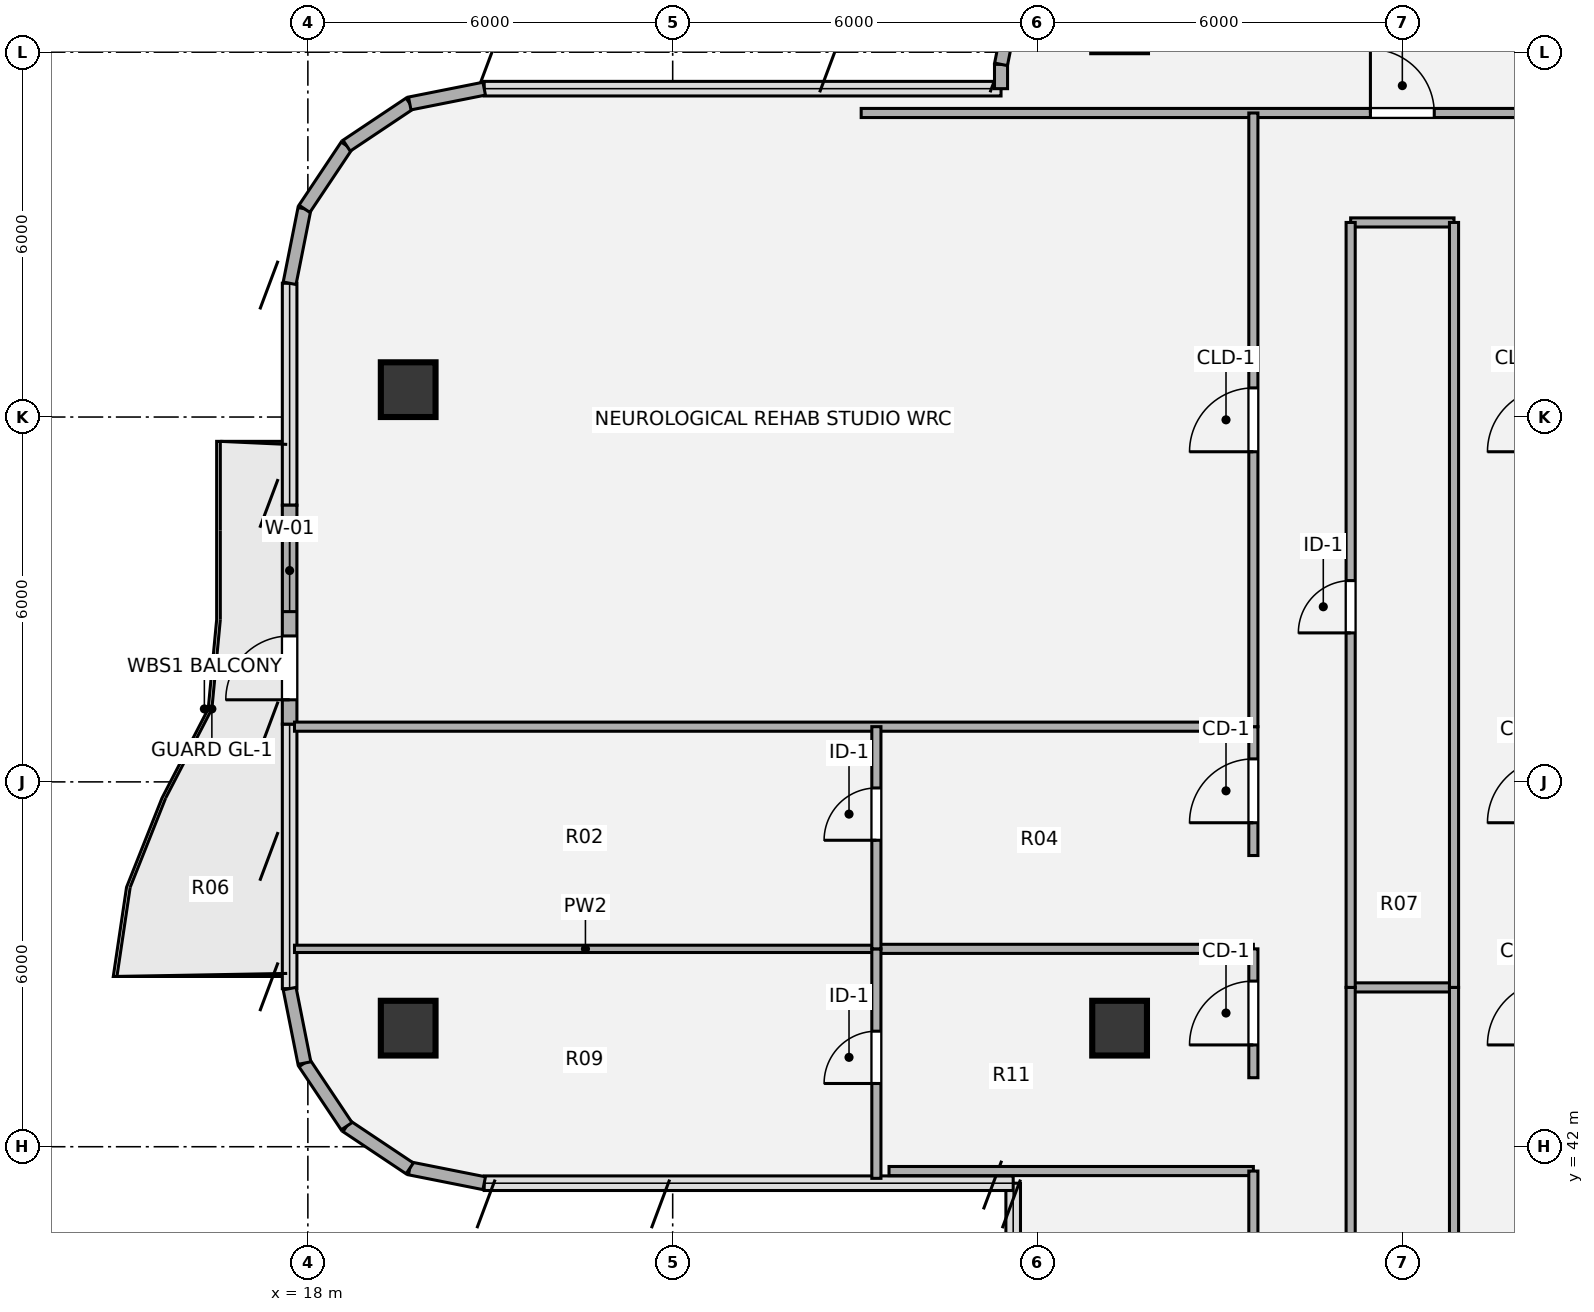
"""IFC4 building model, lengths in metres.
Left out: names, types, materials, properties, quantities, classifications, styles, units other than length and angle.
Written with IfcOpenShell. Run it as: python <this file> out.ifc"""

import sys

from ifc_helpers import new_model, si_unit, direction, frame, frame_2d, origin, origin_2d, place, context, subcontext, project, spatial, rectangle, hollow_circle, extrude, source, transform, mapped, element, fill, save


model = new_model("IFC4")
c1 = context("Model", 3, precision=1e-05, world=origin(), true_north=direction((0.0, 1.0)))
c2 = subcontext(c1, "Body", "Model", "MODEL_VIEW")
j1 = project(units=[si_unit("LENGTHUNIT", "METRE"), si_unit("PLANEANGLEUNIT", "RADIAN")], contexts=[c1])
p1 = place(None, origin())
s1 = spatial("IfcSite", under=j1, at=p1, CompositionType="ELEMENT")
p2 = place(p1, origin())
s2 = spatial("IfcBuilding", under=s1, at=p2, CompositionType="ELEMENT")
p3 = place(p2, frame((0.0, 0.0, 241.92)))
s3 = spatial("IfcBuildingStorey", under=s2, at=p3, CompositionType="ELEMENT", Elevation=241.92)
m1 = source(origin(), c2, "Body", "SweptSolid", [
    extrude(hollow_circle(Radius=0.45, WallThickness=0.032, at=origin_2d()), origin(), (0.0, 0.0, 1.0), 3.78),
])
for number, where, z_axis, x_axis in (
    (1, (19.65, 43.95, 0.0), (0.0, 0.0, 1.0), (1.0, 0.0, 0.0)),
    (2, (19.65, 54.45, 0.0), (0.0, 0.0, 1.0), (1.0, 0.0, 0.0)),
    (3, (31.35, 43.95, 0.0), (0.0, 0.0, 1.0), (1.0, 0.0, 0.0)),
):
    element("IfcColumn", number, at=place(p3, frame(where, z_axis=z_axis, x_axis=x_axis)), inside=s3, PredefinedType="COLUMN", context=c2, shape_type="MappedRepresentation", body=[
        mapped(m1, transform((0.0, 0.0, 0.0), x_axis=(1.0, 0.0, 0.0), y_axis=(0.0, 1.0, 0.0), z_axis=(0.0, 0.0, 1.0), scale=1.0)),
    ])
for number, where, z_axis, x_axis in (
    (4, (20.9, 41.4, 0.0), (0.0, 0.0, 1.0), (-0.981, 0.195, 0.0)),
    (5, (19.675, 41.644, 0.0), (0.0, 0.0, 1.0), (-0.831, 0.556, 0.0)),
    (6, (18.637, 42.337, 0.0), (0.0, 0.0, 1.0), (-0.556, 0.831, 0.0)),
    (7, (17.944, 43.375, 0.0), (0.0, 0.0, 1.0), (-0.195, 0.981, 0.0)),
):
    element("IfcWall", number, at=place(p3, frame(where, z_axis=z_axis, x_axis=x_axis)), inside=s3, PredefinedType="SOLIDWALL", context=c2, shape_type="SweptSolid", body=[
        extrude(rectangle(XDim=1.249, YDim=0.215, at=frame_2d((0.624, 0.0))), origin(), (0.0, 0.0, 1.0), 3.53),
    ])
p4 = place(p3, frame((17.7, 48.95, 0.0), z_axis=(0.0, 0.0, 1.0), x_axis=(0.0, 1.0, 0.0)))
e8 = element("IfcWall", 8, at=p4, inside=s3, PredefinedType="SOLIDWALL", context=c2, shape_type="SweptSolid", body=[
    extrude(rectangle(XDim=3.6, YDim=0.24, at=frame_2d((1.8, 0.0))), origin(), (0.0, 0.0, 1.0), 3.53),
])
p5 = place(p4, frame((0.4, 0.0, 0.0)))
e9 = element("IfcOpeningElement", 9, at=p5, cuts=e8, PredefinedType="OPENING", context=c2, shape_type="SweptSolid", body=[
    extrude(rectangle(XDim=1.05, YDim=2.15, at=origin_2d()), frame((0.525, 0.13, 1.075), z_axis=(0.0, -1.0, 0.0), x_axis=(1.0, 0.0, 0.0)), (0.0, 0.0, 1.0), 0.26),
])
p6 = place(p4, frame((1.85, 0.0, 0.85)))
e10 = element("IfcOpeningElement", 10, at=p6, cuts=e8, PredefinedType="OPENING", context=c2, shape_type="SweptSolid", body=[
    extrude(rectangle(XDim=1.35, YDim=1.35, at=origin_2d()), frame((0.675, 0.13, 0.675), z_axis=(0.0, -1.0, 0.0), x_axis=(1.0, 0.0, 0.0)), (0.0, 0.0, 1.0), 0.26),
])
for number, where, z_axis, x_axis in (
    (11, (17.7, 56.2, 0.0), (0.0, 0.0, 1.0), (0.195, 0.981, 0.0)),
    (12, (17.944, 57.425, 0.0), (0.0, 0.0, 1.0), (0.556, 0.831, 0.0)),
    (13, (18.637, 58.463, 0.0), (0.0, 0.0, 1.0), (0.831, 0.556, 0.0)),
    (14, (19.675, 59.156, 0.0), (0.0, 0.0, 1.0), (0.981, 0.195, 0.0)),
):
    element("IfcWall", number, at=place(p3, frame(where, z_axis=z_axis, x_axis=x_axis)), inside=s3, PredefinedType="SOLIDWALL", context=c2, shape_type="SweptSolid", body=[
        extrude(rectangle(XDim=1.249, YDim=0.215, at=frame_2d((0.624, 0.0))), origin(), (0.0, 0.0, 1.0), 3.53),
    ])
p7 = place(p3, frame((29.4, 59.4, 0.0), z_axis=(0.0, 0.0, 1.0), x_axis=(0.0, 1.0, 0.0)))
e15 = element("IfcWall", 15, at=p7, inside=s3, PredefinedType="SOLIDWALL", context=c2, shape_type="SweptSolid", body=[
    extrude(rectangle(XDim=0.4, YDim=0.215, at=frame_2d((0.2, 0.0))), origin(), (0.0, 0.0, 1.0), 3.53),
])
p8 = place(p3, frame((29.4, 59.8, 0.0), z_axis=(0.0, 0.0, 1.0), x_axis=(0.195190360752, 0.980765376158, 0.0)))
e16 = element("IfcWall", 16, at=p8, inside=s3, PredefinedType="SOLIDWALL", context=c2, shape_type="SweptSolid", body=[
    extrude(rectangle(XDim=1.014, YDim=0.215, at=frame_2d((0.507, 0.0))), origin(), (0.0, 0.0, 1.0), 3.53),
])
p9 = place(p3, frame((27.558, 41.6, 0.0), z_axis=(0.0, 0.0, 1.0), x_axis=(1.0, 0.0, 0.0)))
e17 = element("IfcWall", 17, at=p9, inside=s3, PredefinedType="PARTITIONING", context=c2, shape_type="SweptSolid", body=[
    extrude(rectangle(XDim=5.992, YDim=0.15, at=frame_2d((2.996, 0.0))), origin(), (0.0, 0.0, 1.0), 3.5),
])
p10 = place(p3, frame((35.15, 44.62, 0.0), z_axis=(0.0, 0.0, 1.0), x_axis=(1.0, 0.0, 0.0)))
e18 = element("IfcWall", 18, at=p10, inside=s3, PredefinedType="PARTITIONING", context=c2, shape_type="SweptSolid", body=[
    extrude(rectangle(XDim=1.7, YDim=0.15, at=frame_2d((0.85, 0.0))), origin(), (0.0, 0.0, 1.0), 3.259),
])
p11 = place(p3, frame((17.78, 45.254, 0.0), z_axis=(0.0, 0.0, 1.0), x_axis=(1.0, 0.0, 0.0)))
e19 = element("IfcWall", 19, at=p11, inside=s3, PredefinedType="PARTITIONING", context=c2, shape_type="SweptSolid", body=[
    extrude(rectangle(XDim=9.57, YDim=0.12, at=frame_2d((4.785, 0.0))), origin(), (0.0, 0.0, 1.0), 2.982),
])
p12 = place(p3, frame((27.35, 45.254, 0.0), z_axis=(0.0, 0.0, 1.0), x_axis=(1.0, 0.0, 0.0)))
e20 = element("IfcWall", 20, at=p12, inside=s3, PredefinedType="PARTITIONING", context=c2, shape_type="SweptSolid", body=[
    extrude(rectangle(XDim=6.2, YDim=0.15, at=frame_2d((3.1, 0.0))), origin(), (0.0, 0.0, 1.0), 2.982),
])
p13 = place(p3, frame((17.78, 48.908, 0.0), z_axis=(0.0, 0.0, 1.0), x_axis=(1.0, 0.0, 0.0)))
e21 = element("IfcWall", 21, at=p13, inside=s3, PredefinedType="PARTITIONING", context=c2, shape_type="SweptSolid", body=[
    extrude(rectangle(XDim=15.77, YDim=0.15, at=frame_2d((7.885, 0.0))), origin(), (0.0, 0.0, 1.0), 2.982),
])
p14 = place(p3, frame((35.15, 57.2, 0.0), z_axis=(0.0, 0.0, 1.0), x_axis=(1.0, 0.0, 0.0)))
e22 = element("IfcWall", 22, at=p14, inside=s3, PredefinedType="PARTITIONING", context=c2, shape_type="SweptSolid", body=[
    extrude(rectangle(XDim=1.7, YDim=0.15, at=frame_2d((0.85, 0.0))), origin(), (0.0, 0.0, 1.0), 3.308),
])
p15 = place(p3, frame((27.1, 59.0, 0.0), z_axis=(0.0, 0.0, 1.0), x_axis=(1.0, 0.0, 0.0)))
e23 = element("IfcWall", 23, at=p15, inside=s3, PredefinedType="PARTITIONING", context=c2, shape_type="SweptSolid", body=[
    extrude(rectangle(XDim=17.8, YDim=0.15, at=frame_2d((8.9, 0.0))), origin(), (0.0, 0.0, 1.0), 3.308),
])
p16 = place(p15, frame((8.375, 0.0, 0.0)))
e24 = element("IfcOpeningElement", 24, at=p16, cuts=e23, PredefinedType="OPENING", context=c2, shape_type="SweptSolid", body=[
    extrude(rectangle(XDim=1.05, YDim=2.1, at=origin_2d()), frame((0.525, 0.085, 1.05), z_axis=(0.0, -1.0, 0.0), x_axis=(1.0, 0.0, 0.0)), (0.0, 0.0, 1.0), 0.17),
])
p17 = place(p3, frame((27.35, 41.48, 0.0), z_axis=(0.0, 0.0, 1.0), x_axis=(0.0, 1.0, 0.0)))
e25 = element("IfcWall", 25, at=p17, inside=s3, PredefinedType="PARTITIONING", context=c2, shape_type="SweptSolid", body=[
    extrude(rectangle(XDim=3.774, YDim=0.15, at=frame_2d((1.887, 0.0))), origin(), (0.0, 0.0, 1.0), 3.5),
])
p18 = place(p17, frame((1.56, 0.0, 0.0)))
e26 = element("IfcOpeningElement", 26, at=p18, cuts=e25, PredefinedType="OPENING", context=c2, shape_type="SweptSolid", body=[
    extrude(rectangle(XDim=0.86, YDim=2.1, at=origin_2d()), frame((0.43, 0.085, 1.05), z_axis=(0.0, -1.0, 0.0), x_axis=(1.0, 0.0, 0.0)), (0.0, 0.0, 1.0), 0.17),
])
p19 = place(p3, frame((27.35, 45.254, 0.0), z_axis=(0.0, 0.0, 1.0), x_axis=(0.0, 1.0, 0.0)))
e27 = element("IfcWall", 27, at=p19, inside=s3, PredefinedType="PARTITIONING", context=c2, shape_type="SweptSolid", body=[
    extrude(rectangle(XDim=3.654, YDim=0.15, at=frame_2d((1.827, 0.0))), origin(), (0.0, 0.0, 1.0), 3.5),
])
p20 = place(p19, frame((1.786, 0.0, 0.0)))
e28 = element("IfcOpeningElement", 28, at=p20, cuts=e27, PredefinedType="OPENING", context=c2, shape_type="SweptSolid", body=[
    extrude(rectangle(XDim=0.86, YDim=2.1, at=origin_2d()), frame((0.43, 0.085, 1.05), z_axis=(0.0, -1.0, 0.0), x_axis=(1.0, 0.0, 0.0)), (0.0, 0.0, 1.0), 0.17),
])
p21 = place(p3, frame((33.55, 21.2, 0.0), z_axis=(0.0, 0.0, 1.0), x_axis=(0.0, 1.0, 0.0)))
e29 = element("IfcWall", 29, at=p21, inside=s3, PredefinedType="PARTITIONING", context=c2, shape_type="SweptSolid", body=[
    extrude(rectangle(XDim=20.4, YDim=0.15, at=frame_2d((10.2, 0.0))), origin(), (0.0, 0.0, 1.0), 3.5),
])
p22 = place(p21, frame((9.64, 0.0, 0.0)))
e30 = element("IfcOpeningElement", 30, at=p22, cuts=e29, PredefinedType="OPENING", context=c2, shape_type="SweptSolid", body=[
    extrude(rectangle(XDim=0.86, YDim=2.1, at=origin_2d()), frame((0.43, 0.085, 1.05), z_axis=(0.0, -1.0, 0.0), x_axis=(1.0, 0.0, 0.0)), (0.0, 0.0, 1.0), 0.17),
])
p23 = place(p3, frame((33.55, 43.135, 0.0), z_axis=(0.0, 0.0, 1.0), x_axis=(0.0, 1.0, 0.0)))
e31 = element("IfcWall", 31, at=p23, inside=s3, PredefinedType="PARTITIONING", context=c2, shape_type="SweptSolid", body=[
    extrude(rectangle(XDim=2.119, YDim=0.15, at=frame_2d((1.06, 0.0))), origin(), (0.0, 0.0, 1.0), 3.5),
])
p24 = place(p23, frame((0.539, 0.0, 0.0)))
e32 = element("IfcOpeningElement", 32, at=p24, cuts=e31, PredefinedType="OPENING", context=c2, shape_type="SweptSolid", body=[
    extrude(rectangle(XDim=1.05, YDim=2.1, at=origin_2d()), frame((0.525, 0.085, 1.05), z_axis=(0.0, -1.0, 0.0), x_axis=(1.0, 0.0, 0.0)), (0.0, 0.0, 1.0), 0.17),
])
p25 = place(p3, frame((33.55, 46.789, 0.0), z_axis=(0.0, 0.0, 1.0), x_axis=(0.0, 1.0, 0.0)))
e33 = element("IfcWall", 33, at=p25, inside=s3, PredefinedType="PARTITIONING", context=c2, shape_type="SweptSolid", body=[
    extrude(rectangle(XDim=2.119, YDim=0.15, at=frame_2d((1.06, 0.0))), origin(), (0.0, 0.0, 1.0), 3.5),
])
p26 = place(p25, frame((0.539, 0.0, 0.0)))
e34 = element("IfcOpeningElement", 34, at=p26, cuts=e33, PredefinedType="OPENING", context=c2, shape_type="SweptSolid", body=[
    extrude(rectangle(XDim=1.05, YDim=2.1, at=origin_2d()), frame((0.525, 0.085, 1.05), z_axis=(0.0, -1.0, 0.0), x_axis=(1.0, 0.0, 0.0)), (0.0, 0.0, 1.0), 0.17),
])
p27 = place(p3, frame((33.55, 48.908, 0.0), z_axis=(0.0, 0.0, 1.0), x_axis=(0.0, 1.0, 0.0)))
e35 = element("IfcWall", 35, at=p27, inside=s3, PredefinedType="PARTITIONING", context=c2, shape_type="SweptSolid", body=[
    extrude(rectangle(XDim=10.092, YDim=0.15, at=frame_2d((5.046, 0.0))), origin(), (0.0, 0.0, 1.0), 3.5),
])
p28 = place(p27, frame((4.521, 0.0, 0.0)))
e36 = element("IfcOpeningElement", 36, at=p28, cuts=e35, PredefinedType="OPENING", context=c2, shape_type="SweptSolid", body=[
    extrude(rectangle(XDim=1.05, YDim=2.1, at=origin_2d()), frame((0.525, 0.085, 1.05), z_axis=(0.0, -1.0, 0.0), x_axis=(1.0, 0.0, 0.0)), (0.0, 0.0, 1.0), 0.17),
])
p29 = place(p3, frame((35.15, 25.2, 0.0), z_axis=(0.0, 0.0, 1.0), x_axis=(0.0, 1.0, 0.0)))
e37 = element("IfcWall", 37, at=p29, inside=s3, PredefinedType="PARTITIONING", context=c2, shape_type="SweptSolid", body=[
    extrude(rectangle(XDim=19.42, YDim=0.15, at=frame_2d((9.71, 0.0))), origin(), (0.0, 0.0, 1.0), 3.5),
])
p30 = place(p3, frame((35.15, 44.62, 0.0), z_axis=(0.0, 0.0, 1.0), x_axis=(0.0, 1.0, 0.0)))
e38 = element("IfcWall", 38, at=p30, inside=s3, PredefinedType="PARTITIONING", context=c2, shape_type="SweptSolid", body=[
    extrude(rectangle(XDim=12.58, YDim=0.15, at=frame_2d((6.29, 0.0))), origin(), (0.0, 0.0, 1.0), 3.5),
])
p31 = place(p30, frame((5.83, 0.0, 0.0)))
e39 = element("IfcOpeningElement", 39, at=p31, cuts=e38, PredefinedType="OPENING", context=c2, shape_type="SweptSolid", body=[
    extrude(rectangle(XDim=0.86, YDim=2.1, at=origin_2d()), frame((0.43, 0.085, 1.05), z_axis=(0.0, -1.0, 0.0), x_axis=(1.0, 0.0, 0.0)), (0.0, 0.0, 1.0), 0.17),
])
p32 = place(p3, frame((36.85, 25.2, 0.0), z_axis=(0.0, 0.0, 1.0), x_axis=(0.0, 1.0, 0.0)))
e40 = element("IfcWall", 40, at=p32, inside=s3, PredefinedType="PARTITIONING", context=c2, shape_type="SweptSolid", body=[
    extrude(rectangle(XDim=19.42, YDim=0.15, at=frame_2d((9.71, 0.0))), origin(), (0.0, 0.0, 1.0), 3.5),
])
p33 = place(p32, frame((9.185, 0.0, 0.0)))
e41 = element("IfcOpeningElement", 41, at=p33, cuts=e40, PredefinedType="OPENING", context=c2, shape_type="SweptSolid", body=[
    extrude(rectangle(XDim=1.05, YDim=2.1, at=origin_2d()), frame((0.525, 0.085, 1.05), z_axis=(0.0, -1.0, 0.0), x_axis=(1.0, 0.0, 0.0)), (0.0, 0.0, 1.0), 0.17),
])
p34 = place(p3, frame((36.85, 44.62, 0.0), z_axis=(0.0, 0.0, 1.0), x_axis=(0.0, 1.0, 0.0)))
e42 = element("IfcWall", 42, at=p34, inside=s3, PredefinedType="PARTITIONING", context=c2, shape_type="SweptSolid", body=[
    extrude(rectangle(XDim=12.58, YDim=0.15, at=frame_2d((6.29, 0.0))), origin(), (0.0, 0.0, 1.0), 3.5),
])
m2 = source(origin(), c2, "Body", "SweptSolid", [
    extrude(rectangle(XDim=1.05, YDim=2.15, at=origin_2d()), frame((0.525, 0.025, 1.075), z_axis=(0.0, -1.0, 0.0), x_axis=(1.0, 0.0, 0.0)), (0.0, 0.0, 1.0), 0.05),
])
p35 = place(p5, origin())
e43 = element("IfcDoor", 43, at=p35, inside=s3, OperationType="SINGLE_SWING_LEFT", PredefinedType="DOOR", context=c2, shape_type="MappedRepresentation", body=[
    mapped(m2, transform((0.0, 0.0, 0.0), x_axis=(1.0, 0.0, 0.0), y_axis=(0.0, 1.0, 0.0), z_axis=(0.0, 0.0, 1.0), scale=1.0)),
])
fill(e9, e43)
m3 = source(origin(), c2, "Body", "SweptSolid", [
    extrude(rectangle(XDim=1.35, YDim=1.35, at=origin_2d()), frame((0.675, 0.03, 0.675), z_axis=(0.0, -1.0, 0.0), x_axis=(1.0, 0.0, 0.0)), (0.0, 0.0, 1.0), 0.06),
])
p36 = place(p6, origin())
e44 = element("IfcWindow", 44, at=p36, inside=s3, PartitioningType="SINGLE_PANEL", PredefinedType="WINDOW", context=c2, shape_type="MappedRepresentation", body=[
    mapped(m3, transform((0.0, 0.0, 0.0), x_axis=(1.0, 0.0, 0.0), y_axis=(0.0, 1.0, 0.0), z_axis=(0.0, 0.0, 1.0), scale=1.0)),
])
fill(e10, e44)
m4 = source(origin(), c2, "Body", "SweptSolid", [
    extrude(rectangle(XDim=1.05, YDim=2.1, at=origin_2d()), frame((0.525, 0.025, 1.05), z_axis=(0.0, -1.0, 0.0), x_axis=(1.0, 0.0, 0.0)), (0.0, 0.0, 1.0), 0.05),
])
p37 = place(p16, origin())
e45 = element("IfcDoor", 45, at=p37, inside=s3, OperationType="SINGLE_SWING_LEFT", PredefinedType="DOOR", context=c2, shape_type="MappedRepresentation", body=[
    mapped(m4, transform((0.0, 0.0, 0.0), x_axis=(1.0, 0.0, 0.0), y_axis=(0.0, 1.0, 0.0), z_axis=(0.0, 0.0, 1.0), scale=1.0)),
])
fill(e24, e45)
m5 = source(origin(), c2, "Body", "SweptSolid", [
    extrude(rectangle(XDim=0.86, YDim=2.1, at=origin_2d()), frame((0.43, 0.025, 1.05), z_axis=(0.0, -1.0, 0.0), x_axis=(1.0, 0.0, 0.0)), (0.0, 0.0, 1.0), 0.05),
])
p38 = place(p18, origin())
e46 = element("IfcDoor", 46, at=p38, inside=s3, OperationType="SINGLE_SWING_LEFT", PredefinedType="DOOR", context=c2, shape_type="MappedRepresentation", body=[
    mapped(m5, transform((0.0, 0.0, 0.0), x_axis=(1.0, 0.0, 0.0), y_axis=(0.0, 1.0, 0.0), z_axis=(0.0, 0.0, 1.0), scale=1.0)),
])
fill(e26, e46)
p39 = place(p20, origin())
e47 = element("IfcDoor", 47, at=p39, inside=s3, OperationType="SINGLE_SWING_LEFT", PredefinedType="DOOR", context=c2, shape_type="MappedRepresentation", body=[
    mapped(m5, transform((0.0, 0.0, 0.0), x_axis=(1.0, 0.0, 0.0), y_axis=(0.0, 1.0, 0.0), z_axis=(0.0, 0.0, 1.0), scale=1.0)),
])
fill(e28, e47)
m6 = source(origin(), c2, "Body", "SweptSolid", [
    extrude(rectangle(XDim=1.05, YDim=2.1, at=origin_2d()), frame((0.525, 0.025, 1.05), z_axis=(0.0, -1.0, 0.0), x_axis=(1.0, 0.0, 0.0)), (0.0, 0.0, 1.0), 0.05),
])
p40 = place(p24, origin())
e48 = element("IfcDoor", 48, at=p40, inside=s3, OperationType="SINGLE_SWING_LEFT", PredefinedType="DOOR", context=c2, shape_type="MappedRepresentation", body=[
    mapped(m6, transform((0.0, 0.0, 0.0), x_axis=(1.0, 0.0, 0.0), y_axis=(0.0, 1.0, 0.0), z_axis=(0.0, 0.0, 1.0), scale=1.0)),
])
fill(e32, e48)
p41 = place(p26, origin())
e49 = element("IfcDoor", 49, at=p41, inside=s3, OperationType="SINGLE_SWING_LEFT", PredefinedType="DOOR", context=c2, shape_type="MappedRepresentation", body=[
    mapped(m6, transform((0.0, 0.0, 0.0), x_axis=(1.0, 0.0, 0.0), y_axis=(0.0, 1.0, 0.0), z_axis=(0.0, 0.0, 1.0), scale=1.0)),
])
fill(e34, e49)
p42 = place(p28, origin())
e50 = element("IfcDoor", 50, at=p42, inside=s3, OperationType="SINGLE_SWING_LEFT", PredefinedType="DOOR", context=c2, shape_type="MappedRepresentation", body=[
    mapped(m4, transform((0.0, 0.0, 0.0), x_axis=(1.0, 0.0, 0.0), y_axis=(0.0, 1.0, 0.0), z_axis=(0.0, 0.0, 1.0), scale=1.0)),
])
fill(e36, e50)
p43 = place(p31, origin())
e51 = element("IfcDoor", 51, at=p43, inside=s3, OperationType="SINGLE_SWING_LEFT", PredefinedType="DOOR", context=c2, shape_type="MappedRepresentation", body=[
    mapped(m5, transform((0.0, 0.0, 0.0), x_axis=(1.0, 0.0, 0.0), y_axis=(0.0, 1.0, 0.0), z_axis=(0.0, 0.0, 1.0), scale=1.0)),
])
fill(e39, e51)
save(model, sys.argv[1])
